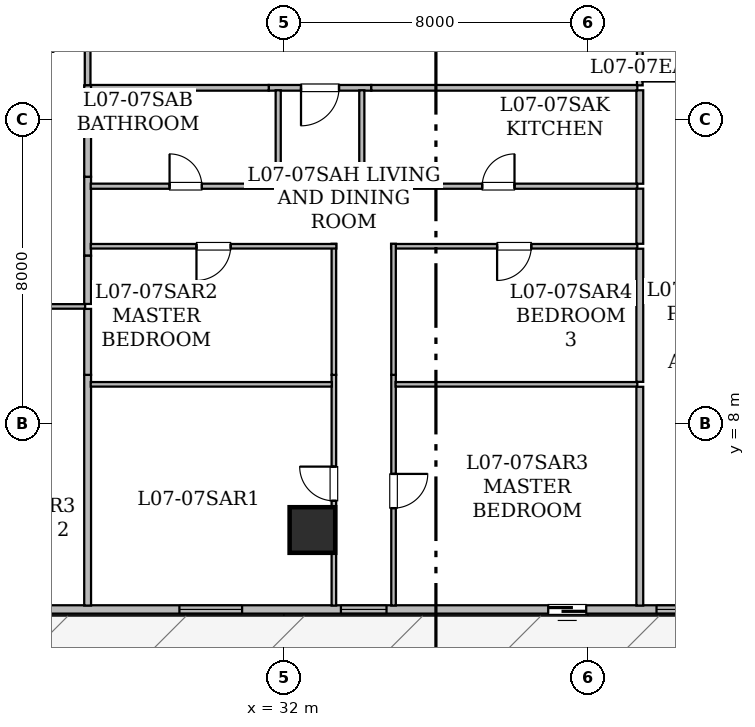
"""IFC4 building model, lengths in metres.
Left out: names, types, materials, properties, quantities, classifications, styles, units other than length and angle.
Written with IfcOpenShell. Run it as: python <this file> out.ifc"""

import sys

from ifc_helpers import new_model, si_unit, direction, frame, frame_2d, origin, origin_2d, place, context, subcontext, project, spatial, rectangle, hollow_rectangle, extrude, element, fill, save


model = new_model("IFC4")
c1 = context("Model", 3, precision=1e-05, world=origin(), true_north=direction((0.0, 1.0)))
c2 = subcontext(c1, "Body", "Model", "MODEL_VIEW")
j1 = project(units=[si_unit("LENGTHUNIT", "METRE"), si_unit("PLANEANGLEUNIT", "RADIAN")], contexts=[c1])
p1 = place(None, origin())
s1 = spatial("IfcSite", under=j1, at=p1, CompositionType="ELEMENT")
p2 = place(p1, origin())
s2 = spatial("IfcBuilding", under=s1, at=p2, CompositionType="ELEMENT")
p3 = place(p2, frame((0.0, 0.0, 33.3)))
s3 = spatial("IfcBuildingStorey", under=s2, at=p3, CompositionType="ELEMENT", Elevation=33.3)
p4 = place(p3, frame((32.75, 5.2, 0.025), z_axis=(0.0, 0.0, 1.0), x_axis=(1.0, 0.0, 0.0)))
e1 = element("IfcColumn", 1, at=p4, inside=s3, PredefinedType="COLUMN", context=c2, shape_type="SweptSolid", body=[
    extrude(hollow_rectangle(XDim=1.2, YDim=1.2, WallThickness=0.06, at=origin_2d()), origin(), (0.0, 0.0, 1.0), 3.625),
])
p5 = place(p3, frame((45.683, 3.11, 0.0), z_axis=(0.0, 0.0, 1.0), x_axis=(-1.0, 0.0, 0.0)))
e2 = element("IfcWall", 2, at=p5, inside=s3, PredefinedType="STANDARD", context=c2, shape_type="SweptSolid", body=[
    extrude(rectangle(XDim=37.368, YDim=0.22, at=frame_2d((18.684, 0.0))), origin(), (0.0, 0.0, 1.0), 3.43),
])
p6 = place(p5, frame((5.728, 0.0, 0.0)))
e3 = element("IfcOpeningElement", 3, at=p6, cuts=e2, PredefinedType="OPENING", context=c2, shape_type="SweptSolid", body=[
    extrude(rectangle(XDim=1.0, YDim=2.15, at=frame_2d((0.5, 1.075))), frame((0.0, 0.12, 0.0), z_axis=(0.0, -1.0, 0.0), x_axis=(1.0, 0.0, 0.0)), (0.0, 0.0, 1.0), 0.24),
])
p7 = place(p5, frame((31.194, 0.0, 0.85)))
e4 = element("IfcOpeningElement", 4, at=p7, cuts=e2, PredefinedType="OPENING", context=c2, shape_type="SweptSolid", body=[
    extrude(rectangle(XDim=1.65, YDim=1.55, at=frame_2d((0.825, 0.775))), frame((0.0, 0.12, 0.0), z_axis=(0.0, -1.0, 0.0), x_axis=(1.0, 0.0, 0.0)), (0.0, 0.0, 1.0), 0.24),
])
p8 = place(p5, frame((23.492, 0.0, 0.8)))
e5 = element("IfcOpeningElement", 5, at=p8, cuts=e2, PredefinedType="OPENING", context=c2, shape_type="SweptSolid", body=[
    extrude(rectangle(XDim=1.2, YDim=1.5, at=frame_2d((0.6, 0.75))), frame((0.0, 0.12, 0.0), z_axis=(0.0, -1.0, 0.0), x_axis=(1.0, 0.0, 0.0)), (0.0, 0.0, 1.0), 0.24),
])
p9 = place(p5, frame((26.282, 0.0, 0.85)))
e6 = element("IfcOpeningElement", 6, at=p9, cuts=e2, PredefinedType="OPENING", context=c2, shape_type="SweptSolid", body=[
    extrude(rectangle(XDim=1.65, YDim=1.55, at=frame_2d((0.825, 0.775))), frame((0.0, 0.12, 0.0), z_axis=(0.0, -1.0, 0.0), x_axis=(1.0, 0.0, 0.0)), (0.0, 0.0, 1.0), 0.24),
])
p10 = place(p5, frame((20.253, 0.0, 0.85)))
e7 = element("IfcOpeningElement", 7, at=p10, cuts=e2, PredefinedType="OPENING", context=c2, shape_type="SweptSolid", body=[
    extrude(rectangle(XDim=1.65, YDim=1.55, at=frame_2d((0.825, 0.775))), frame((0.0, 0.12, 0.0), z_axis=(0.0, -1.0, 0.0), x_axis=(1.0, 0.0, 0.0)), (0.0, 0.0, 1.0), 0.24),
])
p11 = place(p5, frame((10.983, 0.0, 0.8)))
e8 = element("IfcOpeningElement", 8, at=p11, cuts=e2, PredefinedType="OPENING", context=c2, shape_type="SweptSolid", body=[
    extrude(rectangle(XDim=1.2, YDim=1.5, at=frame_2d((0.6, 0.75))), frame((0.0, 0.12, 0.0), z_axis=(0.0, -1.0, 0.0), x_axis=(1.0, 0.0, 0.0)), (0.0, 0.0, 1.0), 0.24),
])
p12 = place(p5, frame((14.783, 0.0, 0.85)))
e9 = element("IfcOpeningElement", 9, at=p12, cuts=e2, PredefinedType="OPENING", context=c2, shape_type="SweptSolid", body=[
    extrude(rectangle(XDim=1.65, YDim=1.55, at=frame_2d((0.825, 0.775))), frame((0.0, 0.12, 0.0), z_axis=(0.0, -1.0, 0.0), x_axis=(1.0, 0.0, 0.0)), (0.0, 0.0, 1.0), 0.24),
])
p13 = place(p5, frame((2.228, 0.0, 0.85)))
e10 = element("IfcOpeningElement", 10, at=p13, cuts=e2, PredefinedType="OPENING", context=c2, shape_type="SweptSolid", body=[
    extrude(rectangle(XDim=1.65, YDim=1.55, at=frame_2d((0.825, 0.775))), frame((0.0, 0.12, 0.0), z_axis=(0.0, -1.0, 0.0), x_axis=(1.0, 0.0, 0.0)), (0.0, 0.0, 1.0), 0.24),
])
p14 = place(p5, frame((0.187, 0.0, 0.8)))
e11 = element("IfcOpeningElement", 11, at=p14, cuts=e2, PredefinedType="OPENING", context=c2, shape_type="SweptSolid", body=[
    extrude(rectangle(XDim=1.2, YDim=1.5, at=frame_2d((0.6, 0.75))), frame((0.0, 0.12, 0.0), z_axis=(0.0, -1.0, 0.0), x_axis=(1.0, 0.0, 0.0)), (0.0, 0.0, 1.0), 0.24),
])
p15 = place(p3, frame((26.835, 16.9, 0.0), z_axis=(0.0, 0.0, 1.0), x_axis=(0.0, 1.0, 0.0)))
e12 = element("IfcWall", 12, at=p15, inside=s3, PredefinedType="STANDARD", context=c2, shape_type="SweptSolid", body=[
    extrude(rectangle(XDim=3.726, YDim=0.15, at=frame_2d((1.863, 0.0))), origin(), (0.0, 0.0, 1.0), 2.647),
])
p16 = place(p3, frame((34.299, 16.835, 0.0), z_axis=(0.0, 0.0, 1.0), x_axis=(-1.0, 0.0, 0.0)))
e13 = element("IfcWall", 13, at=p16, inside=s3, PredefinedType="STANDARD", context=c2, shape_type="SweptSolid", body=[
    extrude(rectangle(XDim=2.698, YDim=0.15, at=frame_2d((1.349, 0.0))), origin(), (0.0, 0.0, 1.0), 3.43),
])
p17 = place(p16, frame((0.849, 0.0, 0.0)))
e14 = element("IfcOpeningElement", 14, at=p17, cuts=e13, PredefinedType="OPENING", context=c2, shape_type="SweptSolid", body=[
    extrude(rectangle(XDim=1.0, YDim=2.15, at=frame_2d((0.5, 1.075))), frame((0.0, 0.085, 0.0), z_axis=(0.0, -1.0, 0.0), x_axis=(1.0, 0.0, 0.0)), (0.0, 0.0, 1.0), 0.17),
])
p18 = place(p3, frame((31.601, 16.835, 0.0), z_axis=(0.0, 0.0, 1.0), x_axis=(-1.0, 0.0, 0.0)))
e15 = element("IfcWall", 15, at=p18, inside=s3, PredefinedType="STANDARD", context=c2, shape_type="SweptSolid", body=[
    extrude(rectangle(XDim=4.701, YDim=0.15, at=frame_2d((2.351, 0.0))), origin(), (0.0, 0.0, 1.0), 2.647),
])
p19 = place(p3, frame((41.3, 16.835, 0.0), z_axis=(0.0, 0.0, 1.0), x_axis=(-1.0, 0.0, 0.0)))
e16 = element("IfcWall", 16, at=p19, inside=s3, PredefinedType="STANDARD", context=c2, shape_type="SweptSolid", body=[
    extrude(rectangle(XDim=7.001, YDim=0.15, at=frame_2d((3.5, 0.0))), origin(), (0.0, 0.0, 1.0), 3.43),
])
p20 = place(p3, frame((41.365, 17.318, 0.0), z_axis=(0.0, 0.0, 1.0), x_axis=(0.0, -1.0, 0.0)))
e17 = element("IfcWall", 17, at=p20, inside=s3, PredefinedType="STANDARD", context=c2, shape_type="SweptSolid", body=[
    extrude(rectangle(XDim=0.418, YDim=0.15, at=frame_2d((0.209, 0.0))), origin(), (0.0, 0.0, 1.0), 3.43),
])
p21 = place(p3, frame((41.365, 20.785, 0.0), z_axis=(0.0, 0.0, 1.0), x_axis=(0.0, -1.0, 0.0)))
e18 = element("IfcWall", 18, at=p21, inside=s3, PredefinedType="STANDARD", context=c2, shape_type="SweptSolid", body=[
    extrude(rectangle(XDim=3.467, YDim=0.15, at=frame_2d((1.733, 0.0))), origin(), (0.0, 0.0, 1.0), 2.647),
])
p22 = place(p3, frame((22.43, 11.083, 0.0), z_axis=(0.0, 0.0, 1.0), x_axis=(1.0, 0.0, 0.0)))
e19 = element("IfcWall", 19, at=p22, inside=s3, PredefinedType="PARTITIONING", context=c2, shape_type="SweptSolid", body=[
    extrude(rectangle(XDim=4.34, YDim=0.12, at=frame_2d((2.17, 0.0))), origin(), (0.0, 0.0, 1.0), 3.43),
])
p23 = place(p3, frame((26.835, 9.282, 0.0), z_axis=(0.0, 0.0, 1.0), x_axis=(0.0, -1.0, 0.0)))
e20 = element("IfcWall", 20, at=p23, inside=s3, PredefinedType="STANDARD", context=c2, shape_type="SweptSolid", body=[
    extrude(rectangle(XDim=6.07, YDim=0.18, at=frame_2d((3.035, 0.0))), origin(), (0.0, 0.0, 1.0), 2.803),
])
p24 = place(p3, frame((26.835, 11.018, 0.0), z_axis=(0.0, 0.0, 1.0), x_axis=(0.0, -1.0, 0.0)))
e21 = element("IfcWall", 21, at=p24, inside=s3, PredefinedType="STANDARD", context=c2, shape_type="SweptSolid", body=[
    extrude(rectangle(XDim=1.736, YDim=0.18, at=frame_2d((0.868, 0.0))), origin(), (0.0, 0.0, 1.0), 3.43),
])
p25 = place(p3, frame((26.835, 14.495, 0.0), z_axis=(0.0, 0.0, 1.0), x_axis=(0.0, -1.0, 0.0)))
e22 = element("IfcWall", 22, at=p25, inside=s3, PredefinedType="STANDARD", context=c2, shape_type="SweptSolid", body=[
    extrude(rectangle(XDim=2.078, YDim=0.18, at=frame_2d((1.039, 0.0))), origin(), (0.0, 0.0, 1.0), 3.43),
])
p26 = place(p3, frame((26.835, 16.9, 0.0), z_axis=(0.0, 0.0, 1.0), x_axis=(0.0, -1.0, 0.0)))
e23 = element("IfcWall", 23, at=p26, inside=s3, PredefinedType="STANDARD", context=c2, shape_type="SweptSolid", body=[
    extrude(rectangle(XDim=2.405, YDim=0.18, at=frame_2d((1.202, 0.0))), origin(), (0.0, 0.0, 1.0), 3.43),
])
p27 = place(p3, frame((26.835, 12.417, 0.0), z_axis=(0.0, 0.0, 1.0), x_axis=(0.0, -1.0, 0.0)))
e24 = element("IfcWall", 24, at=p27, inside=s3, PredefinedType="STANDARD", context=c2, shape_type="SweptSolid", body=[
    extrude(rectangle(XDim=1.269, YDim=0.18, at=frame_2d((0.635, 0.0))), origin(), (0.0, 0.0, 1.0), 3.43),
])
p28 = place(p3, frame((26.917, 14.246, 0.0), z_axis=(0.0, 0.0, 1.0), x_axis=(1.0, 0.0, 0.0)))
e25 = element("IfcWall", 25, at=p28, inside=s3, PredefinedType="PARTITIONING", context=c2, shape_type="SweptSolid", body=[
    extrude(rectangle(XDim=4.998, YDim=0.135, at=frame_2d((2.499, 0.0))), origin(), (0.0, 0.0, 1.0), 2.647),
])
p29 = place(p28, frame((2.074, 0.0, 0.0)))
e26 = element("IfcOpeningElement", 26, at=p29, cuts=e25, PredefinedType="OPENING", context=c2, shape_type="SweptSolid", body=[
    extrude(rectangle(XDim=0.85, YDim=2.1, at=frame_2d((0.425, 1.05))), frame((0.0, 0.077, 0.0), z_axis=(0.0, -1.0, 0.0), x_axis=(1.0, 0.0, 0.0)), (0.0, 0.0, 1.0), 0.155),
])
for number, where, z_axis, x_axis in (
    (27, (31.85, 14.181, 0.0), (0.0, 0.0, 1.0), (0.0, 1.0, 0.0)),
    (28, (34.05, 16.77, 0.0), (0.0, 0.0, 1.0), (0.0, -1.0, 0.0)),
):
    element("IfcWall", number, at=place(p3, frame(where, z_axis=z_axis, x_axis=x_axis)), inside=s3, PredefinedType="PARTITIONING", context=c2, shape_type="SweptSolid", body=[
        extrude(rectangle(XDim=2.589, YDim=0.135, at=frame_2d((1.294, 0.0))), origin(), (0.0, 0.0, 1.0), 3.43),
    ])
p30 = place(p3, frame((33.985, 14.246, 0.0), z_axis=(0.0, 0.0, 1.0), x_axis=(1.0, 0.0, 0.0)))
e29 = element("IfcWall", 29, at=p30, inside=s3, PredefinedType="PARTITIONING", context=c2, shape_type="SweptSolid", body=[
    extrude(rectangle(XDim=7.315, YDim=0.135, at=frame_2d((3.657, 0.0))), origin(), (0.0, 0.0, 1.0), 3.43),
])
p31 = place(p30, frame((3.233, 0.0, 0.0)))
e30 = element("IfcOpeningElement", 30, at=p31, cuts=e29, PredefinedType="OPENING", context=c2, shape_type="SweptSolid", body=[
    extrude(rectangle(XDim=0.85, YDim=2.1, at=frame_2d((0.425, 1.05))), frame((0.0, 0.077, 0.0), z_axis=(0.0, -1.0, 0.0), x_axis=(1.0, 0.0, 0.0)), (0.0, 0.0, 1.0), 0.155),
])
p32 = place(p3, frame((33.315, 3.212, 0.0), z_axis=(0.0, 0.0, 1.0), x_axis=(0.0, 1.0, 0.0)))
e31 = element("IfcWall", 31, at=p32, inside=s3, PredefinedType="PARTITIONING", context=c2, shape_type="SweptSolid", body=[
    extrude(rectangle(XDim=6.07, YDim=0.12, at=frame_2d((3.035, 0.0))), origin(), (0.0, 0.0, 1.0), 2.803),
])
p33 = place(p32, frame((2.756, 0.0, 0.0)))
e32 = element("IfcOpeningElement", 32, at=p33, cuts=e31, PredefinedType="OPENING", context=c2, shape_type="SweptSolid", body=[
    extrude(rectangle(XDim=0.9, YDim=2.1, at=frame_2d((0.45, 1.05))), frame((0.0, 0.07, 0.0), z_axis=(0.0, -1.0, 0.0), x_axis=(1.0, 0.0, 0.0)), (0.0, 0.0, 1.0), 0.14),
])
p34 = place(p3, frame((33.315, 9.282, 0.0), z_axis=(0.0, 0.0, 1.0), x_axis=(0.0, 1.0, 0.0)))
e33 = element("IfcWall", 33, at=p34, inside=s3, PredefinedType="PARTITIONING", context=c2, shape_type="SweptSolid", body=[
    extrude(rectangle(XDim=3.449, YDim=0.12, at=frame_2d((1.725, 0.0))), origin(), (0.0, 0.0, 1.0), 3.43),
])
p35 = place(p3, frame((33.38, 12.666, 0.0), z_axis=(0.0, 0.0, 1.0), x_axis=(-1.0, 0.0, 0.0)))
e34 = element("IfcWall", 34, at=p35, inside=s3, PredefinedType="PARTITIONING", context=c2, shape_type="SweptSolid", body=[
    extrude(rectangle(XDim=6.463, YDim=0.12, at=frame_2d((3.231, 0.0))), origin(), (0.0, 0.0, 1.0), 2.647),
])
p36 = place(p35, frame((2.781, 0.0, 0.0)))
e35 = element("IfcOpeningElement", 35, at=p36, cuts=e34, PredefinedType="OPENING", context=c2, shape_type="SweptSolid", body=[
    extrude(rectangle(XDim=0.9, YDim=2.1, at=frame_2d((0.45, 1.05))), frame((0.0, 0.07, 0.0), z_axis=(0.0, -1.0, 0.0), x_axis=(1.0, 0.0, 0.0)), (0.0, 0.0, 1.0), 0.14),
])
p37 = place(p3, frame((34.885, 9.282, 0.0), z_axis=(0.0, 0.0, 1.0), x_axis=(0.0, -1.0, 0.0)))
e36 = element("IfcWall", 36, at=p37, inside=s3, PredefinedType="PARTITIONING", context=c2, shape_type="SweptSolid", body=[
    extrude(rectangle(XDim=6.07, YDim=0.12, at=frame_2d((3.035, 0.0))), origin(), (0.0, 0.0, 1.0), 2.803),
])
p38 = place(p37, frame((2.606, 0.0, 0.0)))
e37 = element("IfcOpeningElement", 37, at=p38, cuts=e36, PredefinedType="OPENING", context=c2, shape_type="SweptSolid", body=[
    extrude(rectangle(XDim=0.9, YDim=2.1, at=frame_2d((0.45, 1.05))), frame((0.0, 0.07, 0.0), z_axis=(0.0, -1.0, 0.0), x_axis=(1.0, 0.0, 0.0)), (0.0, 0.0, 1.0), 0.14),
])
p39 = place(p3, frame((41.3, 12.666, 0.0), z_axis=(0.0, 0.0, 1.0), x_axis=(-1.0, 0.0, 0.0)))
e38 = element("IfcWall", 38, at=p39, inside=s3, PredefinedType="PARTITIONING", context=c2, shape_type="SweptSolid", body=[
    extrude(rectangle(XDim=6.48, YDim=0.12, at=frame_2d((3.24, 0.0))), origin(), (0.0, 0.0, 1.0), 3.43),
])
p40 = place(p39, frame((2.79, 0.0, 0.0)))
e39 = element("IfcOpeningElement", 39, at=p40, cuts=e38, PredefinedType="OPENING", context=c2, shape_type="SweptSolid", body=[
    extrude(rectangle(XDim=0.9, YDim=2.1, at=frame_2d((0.45, 1.05))), frame((0.0, 0.07, 0.0), z_axis=(0.0, -1.0, 0.0), x_axis=(1.0, 0.0, 0.0)), (0.0, 0.0, 1.0), 0.14),
])
p41 = place(p3, frame((34.885, 12.731, 0.0), z_axis=(0.0, 0.0, 1.0), x_axis=(0.0, -1.0, 0.0)))
e40 = element("IfcWall", 40, at=p41, inside=s3, PredefinedType="PARTITIONING", context=c2, shape_type="SweptSolid", body=[
    extrude(rectangle(XDim=3.449, YDim=0.12, at=frame_2d((1.725, 0.0))), origin(), (0.0, 0.0, 1.0), 3.43),
])
p42 = place(p3, frame((41.365, 14.181, 0.0), z_axis=(0.0, 0.0, 1.0), x_axis=(0.0, -1.0, 0.0)))
e41 = element("IfcWall", 41, at=p42, inside=s3, PredefinedType="STANDARD", context=c2, shape_type="SweptSolid", body=[
    extrude(rectangle(XDim=1.45, YDim=0.18, at=frame_2d((0.725, 0.0))), origin(), (0.0, 0.0, 1.0), 3.43),
])
p43 = place(p3, frame((41.365, 16.77, 0.0), z_axis=(0.0, 0.0, 1.0), x_axis=(0.0, -1.0, 0.0)))
e42 = element("IfcWall", 42, at=p43, inside=s3, PredefinedType="STANDARD", context=c2, shape_type="SweptSolid", body=[
    extrude(rectangle(XDim=2.459, YDim=0.18, at=frame_2d((1.229, 0.0))), origin(), (0.0, 0.0, 1.0), 3.43),
])
p44 = place(p3, frame((26.917, 9.033, 0.0), z_axis=(0.0, 0.0, 1.0), x_axis=(1.0, 0.0, 0.0)))
e43 = element("IfcWall", 43, at=p44, inside=s3, PredefinedType="PARTITIONING", context=c2, shape_type="SweptSolid", body=[
    extrude(rectangle(XDim=6.344, YDim=0.12, at=frame_2d((3.172, 0.0))), origin(), (0.0, 0.0, 1.0), 2.647),
])
p45 = place(p3, frame((34.939, 9.033, 0.0), z_axis=(0.0, 0.0, 1.0), x_axis=(1.0, 0.0, 0.0)))
e44 = element("IfcWall", 44, at=p45, inside=s3, PredefinedType="PARTITIONING", context=c2, shape_type="SweptSolid", body=[
    extrude(rectangle(XDim=6.361, YDim=0.12, at=frame_2d((3.181, 0.0))), origin(), (0.0, 0.0, 1.0), 3.43),
])
p46 = place(p3, frame((41.365, 8.968, 0.0), z_axis=(0.0, 0.0, 1.0), x_axis=(0.0, -1.0, 0.0)))
e45 = element("IfcWall", 45, at=p46, inside=s3, PredefinedType="STANDARD", context=c2, shape_type="SweptSolid", body=[
    extrude(rectangle(XDim=5.756, YDim=0.18, at=frame_2d((2.878, 0.0))), origin(), (0.0, 0.0, 1.0), 2.803),
])
p47 = place(p3, frame((41.365, 12.601, 0.0), z_axis=(0.0, 0.0, 1.0), x_axis=(0.0, -1.0, 0.0)))
e46 = element("IfcWall", 46, at=p47, inside=s3, PredefinedType="STANDARD", context=c2, shape_type="SweptSolid", body=[
    extrude(rectangle(XDim=3.503, YDim=0.18, at=frame_2d((1.751, 0.0))), origin(), (0.0, 0.0, 1.0), 3.43),
])
p48 = place(p3, frame((41.432, 17.069, 0.0), z_axis=(0.0, 0.0, 1.0), x_axis=(1.0, 0.0, 0.0)))
e47 = element("IfcWall", 47, at=p48, inside=s3, PredefinedType="PARTITIONING", context=c2, shape_type="SweptSolid", body=[
    extrude(rectangle(XDim=2.398, YDim=0.135, at=frame_2d((1.199, 0.0))), origin(), (0.0, 0.0, 1.0), 2.647),
])
p49 = place(p6, origin())
e48 = element("IfcDoor", 48, at=p49, inside=s3, OperationType="SLIDING_TO_LEFT", PredefinedType="DOOR", context=c2, shape_type="SweptSolid", body=[
    extrude(rectangle(XDim=1.0, YDim=2.15, at=frame_2d((0.5, 1.075))), frame((0.0, 0.025, 0.0), z_axis=(0.0, -1.0, 0.0), x_axis=(1.0, 0.0, 0.0)), (0.0, 0.0, 1.0), 0.05),
])
fill(e3, e48)
p50 = place(p11, origin())
e49 = element("IfcWindow", 49, at=p50, inside=s3, PartitioningType="SINGLE_PANEL", PredefinedType="WINDOW", context=c2, shape_type="SweptSolid", body=[
    extrude(rectangle(XDim=1.2, YDim=1.5, at=frame_2d((0.6, 0.75))), frame((0.0, 0.03, 0.0), z_axis=(0.0, -1.0, 0.0), x_axis=(1.0, 0.0, 0.0)), (0.0, 0.0, 1.0), 0.06),
])
fill(e8, e49)
p51 = place(p12, origin())
e50 = element("IfcWindow", 50, at=p51, inside=s3, PartitioningType="SINGLE_PANEL", PredefinedType="WINDOW", context=c2, shape_type="SweptSolid", body=[
    extrude(rectangle(XDim=1.65, YDim=1.55, at=frame_2d((0.825, 0.775))), frame((0.0, 0.03, 0.0), z_axis=(0.0, -1.0, 0.0), x_axis=(1.0, 0.0, 0.0)), (0.0, 0.0, 1.0), 0.06),
])
fill(e9, e50)
p52 = place(p13, origin())
e51 = element("IfcWindow", 51, at=p52, inside=s3, PartitioningType="SINGLE_PANEL", PredefinedType="WINDOW", context=c2, shape_type="SweptSolid", body=[
    extrude(rectangle(XDim=1.65, YDim=1.55, at=frame_2d((0.825, 0.775))), frame((0.0, 0.03, 0.0), z_axis=(0.0, -1.0, 0.0), x_axis=(1.0, 0.0, 0.0)), (0.0, 0.0, 1.0), 0.06),
])
fill(e10, e51)
p53 = place(p17, origin())
e52 = element("IfcDoor", 52, at=p53, inside=s3, OperationType="SINGLE_SWING_RIGHT", PredefinedType="DOOR", context=c2, shape_type="SweptSolid", body=[
    extrude(rectangle(XDim=1.0, YDim=2.15, at=frame_2d((0.5, 1.075))), frame((0.0, 0.025, 0.0), z_axis=(0.0, -1.0, 0.0), x_axis=(1.0, 0.0, 0.0)), (0.0, 0.0, 1.0), 0.05),
])
fill(e14, e52)
p54 = place(p29, origin())
e53 = element("IfcDoor", 53, at=p54, inside=s3, OperationType="SINGLE_SWING_LEFT", PredefinedType="DOOR", context=c2, shape_type="SweptSolid", body=[
    extrude(rectangle(XDim=0.85, YDim=2.1, at=frame_2d((0.425, 1.05))), frame((0.0, 0.025, 0.0), z_axis=(0.0, -1.0, 0.0), x_axis=(1.0, 0.0, 0.0)), (0.0, 0.0, 1.0), 0.05),
])
fill(e26, e53)
p55 = place(p31, origin())
e54 = element("IfcDoor", 54, at=p55, inside=s3, OperationType="SINGLE_SWING_RIGHT", PredefinedType="DOOR", context=c2, shape_type="SweptSolid", body=[
    extrude(rectangle(XDim=0.85, YDim=2.1, at=frame_2d((0.425, 1.05))), frame((0.0, 0.025, 0.0), z_axis=(0.0, -1.0, 0.0), x_axis=(1.0, 0.0, 0.0)), (0.0, 0.0, 1.0), 0.05),
])
fill(e30, e54)
p56 = place(p33, origin())
e55 = element("IfcDoor", 55, at=p56, inside=s3, OperationType="SINGLE_SWING_RIGHT", PredefinedType="DOOR", context=c2, shape_type="SweptSolid", body=[
    extrude(rectangle(XDim=0.9, YDim=2.1, at=frame_2d((0.45, 1.05))), frame((0.0, 0.025, 0.0), z_axis=(0.0, -1.0, 0.0), x_axis=(1.0, 0.0, 0.0)), (0.0, 0.0, 1.0), 0.05),
])
fill(e32, e55)
p57 = place(p36, origin())
e56 = element("IfcDoor", 56, at=p57, inside=s3, OperationType="SINGLE_SWING_RIGHT", PredefinedType="DOOR", context=c2, shape_type="SweptSolid", body=[
    extrude(rectangle(XDim=0.9, YDim=2.1, at=frame_2d((0.45, 1.05))), frame((0.0, 0.025, 0.0), z_axis=(0.0, -1.0, 0.0), x_axis=(1.0, 0.0, 0.0)), (0.0, 0.0, 1.0), 0.05),
])
fill(e35, e56)
p58 = place(p38, origin())
e57 = element("IfcDoor", 57, at=p58, inside=s3, OperationType="SINGLE_SWING_LEFT", PredefinedType="DOOR", context=c2, shape_type="SweptSolid", body=[
    extrude(rectangle(XDim=0.9, YDim=2.1, at=frame_2d((0.45, 1.05))), frame((0.0, 0.025, 0.0), z_axis=(0.0, -1.0, 0.0), x_axis=(1.0, 0.0, 0.0)), (0.0, 0.0, 1.0), 0.05),
])
fill(e37, e57)
p59 = place(p40, origin())
e58 = element("IfcDoor", 58, at=p59, inside=s3, OperationType="SINGLE_SWING_RIGHT", PredefinedType="DOOR", context=c2, shape_type="SweptSolid", body=[
    extrude(rectangle(XDim=0.9, YDim=2.1, at=frame_2d((0.45, 1.05))), frame((0.0, 0.025, 0.0), z_axis=(0.0, -1.0, 0.0), x_axis=(1.0, 0.0, 0.0)), (0.0, 0.0, 1.0), 0.05),
])
fill(e39, e58)
save(model, sys.argv[1])
